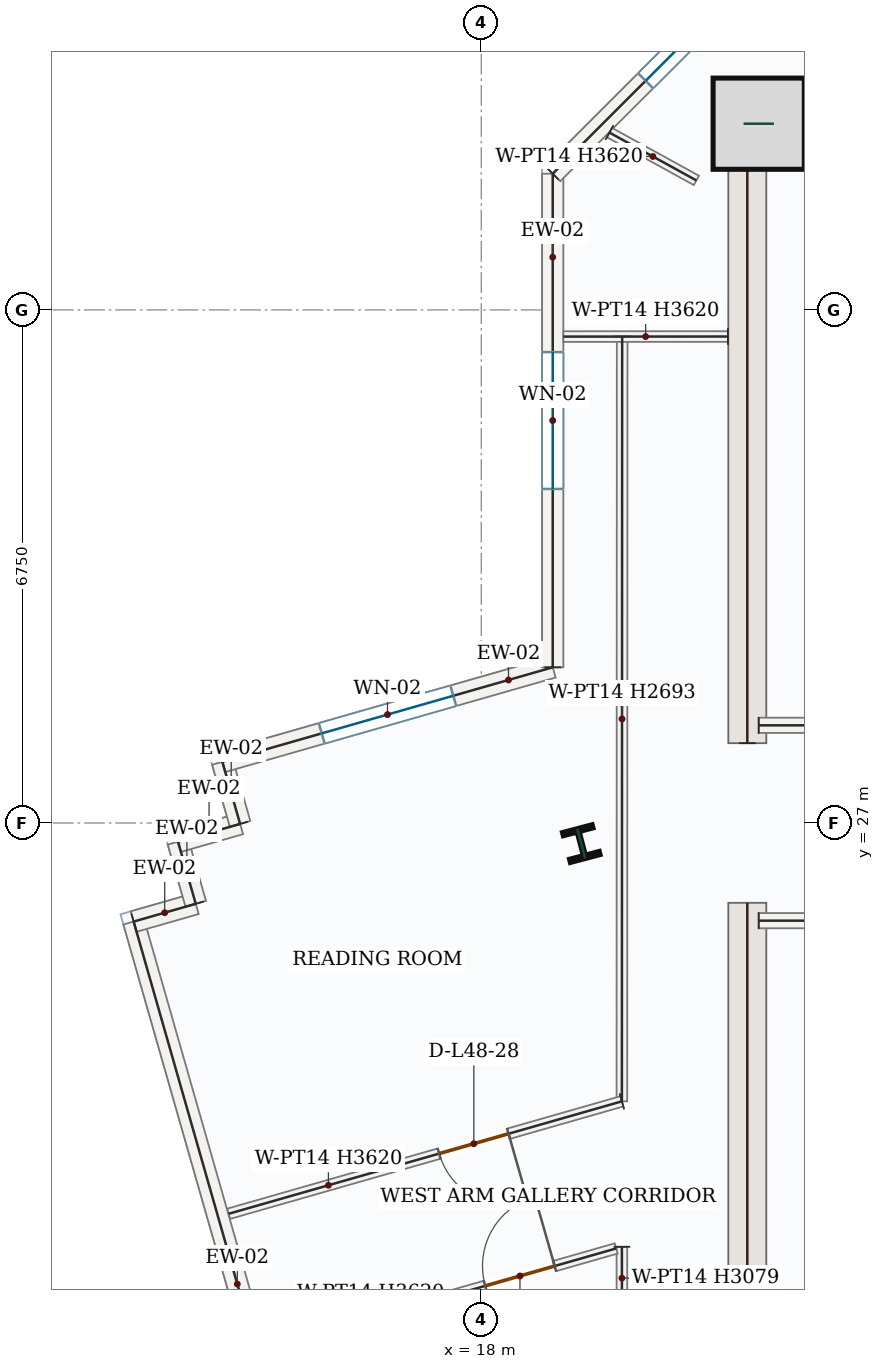
"""IFC4 building model, lengths in metres.
Left out: names, types, materials, properties, quantities, classifications, styles, units other than length and angle.
Written with IfcOpenShell. Run it as: python <this file> out.ifc"""

import sys

from ifc_helpers import new_model, si_unit, direction, frame, frame_2d, origin, origin_2d, place, context, subcontext, project, spatial, rectangle, i_section, extrude, source, transform, mapped, element, fill, save


model = new_model("IFC4")
c1 = context("Model", 3, precision=1e-05, world=origin(), true_north=direction((0.0, 1.0)))
c2 = subcontext(c1, "Body", "Model", "MODEL_VIEW")
j1 = project(units=[si_unit("LENGTHUNIT", "METRE"), si_unit("PLANEANGLEUNIT", "RADIAN")], contexts=[c1])
p1 = place(None, origin())
s1 = spatial("IfcSite", under=j1, at=p1, CompositionType="ELEMENT")
p2 = place(p1, origin())
s2 = spatial("IfcBuilding", under=s1, at=p2, CompositionType="ELEMENT")
p3 = place(p2, frame((0.0, 0.0, 205.8)))
s3 = spatial("IfcBuildingStorey", under=s2, at=p3, CompositionType="ELEMENT", Elevation=205.8)
m1 = source(origin(), c2, "Body", "SweptSolid", [
    extrude(rectangle(XDim=8.55, YDim=0.5, at=frame_2d((4.275, 0.0))), origin(), (0.0, 0.0, 1.0), 3.62),
])
for number, where, z_axis, x_axis in (
    (1, (21.5, 17.4, 0.0), (0.0, 0.0, 1.0), (0.0, 1.0, 0.0)),
    (2, (21.5, 28.05, 0.0), (0.0, 0.0, 1.0), (0.0, 1.0, 0.0)),
):
    element("IfcWall", number, at=place(p3, frame(where, z_axis=z_axis, x_axis=x_axis)), inside=s3, PredefinedType="SHEAR", context=c2, shape_type="MappedRepresentation", body=[
        mapped(m1, transform((0.0, 0.0, 0.0), x_axis=(1.0, 0.0, 0.0), y_axis=(0.0, 1.0, 0.0), z_axis=(0.0, 0.0, 1.0), scale=1.0)),
    ])
m2 = source(origin(), c2, "Body", "SweptSolid", [
    extrude(rectangle(XDim=7.0, YDim=0.5, at=frame_2d((3.5, 0.0))), origin(), (0.0, 0.0, 1.0), 3.62),
])
p4 = place(p3, frame((21.75, 36.35, 0.0), z_axis=(0.0, 0.0, 1.0), x_axis=(1.0, 0.0, 0.0)))
e3 = element("IfcWall", 3, at=p4, inside=s3, PredefinedType="SHEAR", context=c2, shape_type="MappedRepresentation", body=[
    mapped(m2, transform((0.0, 0.0, 0.0), x_axis=(1.0, 0.0, 0.0), y_axis=(0.0, 1.0, 0.0), z_axis=(0.0, 0.0, 1.0), scale=1.0)),
])
m3 = source(origin(), c2, "Body", "SweptSolid", [
    extrude(rectangle(XDim=1.2, YDim=1.2, at=origin_2d()), origin(), (0.0, 0.0, 1.0), 3.9),
])
p5 = place(p3, frame((21.65, 36.2, 0.0), z_axis=(0.0, 0.0, 1.0), x_axis=(1.0, 0.0, 0.0)))
e4 = element("IfcColumn", 4, at=p5, inside=s3, PredefinedType="COLUMN", context=c2, shape_type="MappedRepresentation", body=[
    mapped(m3, transform((0.0, 0.0, 0.0), x_axis=(1.0, 0.0, 0.0), y_axis=(0.0, 1.0, 0.0), z_axis=(0.0, 0.0, 1.0), scale=1.0)),
])
m4 = source(origin(), c2, "Body", "SweptSolid", [
    extrude(i_section(OverallWidth=0.404, OverallDepth=0.407, WebThickness=0.027, FlangeThickness=0.044, FilletRadius=0.018, at=origin_2d()), origin(), (0.0, 0.0, 1.0), 3.9),
])
p6 = place(p3, frame((19.316, 26.729, 0.0), z_axis=(0.0, 0.0, 1.0), x_axis=(0.966823388604, 0.255445757936, 0.0)))
e5 = element("IfcColumn", 5, at=p6, inside=s3, PredefinedType="COLUMN", context=c2, shape_type="MappedRepresentation", body=[
    mapped(m4, transform((0.0, 0.0, 0.0), x_axis=(1.0, 0.0, 0.0), y_axis=(0.0, 1.0, 0.0), z_axis=(0.0, 0.0, 1.0), scale=1.0)),
])
m5 = source(origin(), c2, "Body", "SweptSolid", [
    extrude(rectangle(XDim=9.92, YDim=0.28, at=frame_2d((4.96, 0.0))), origin(), (0.0, 0.0, 1.0), 3.62),
])
p7 = place(p3, frame((16.154, 16.165, 0.0), z_axis=(0.0, 0.0, 1.0), x_axis=(-0.274971401171, 0.961452405758, 0.0)))
e6 = element("IfcWall", 6, at=p7, inside=s3, PredefinedType="SOLIDWALL", context=c2, shape_type="MappedRepresentation", body=[
    mapped(m5, transform((0.0, 0.0, 0.0), x_axis=(1.0, 0.0, 0.0), y_axis=(0.0, 1.0, 0.0), z_axis=(0.0, 0.0, 1.0), scale=1.0)),
])
m6 = source(origin(), c2, "Body", "SweptSolid", [
    extrude(rectangle(XDim=0.85, YDim=0.28, at=frame_2d((0.425, 0.0))), origin(), (0.0, 0.0, 1.0), 3.62),
])
for number, where, z_axis, x_axis in (
    (7, (13.427, 25.703, 0.0), (0.0, 0.0, 1.0), (0.961, 0.275, 0.0)),
    (8, (14.244, 25.937, 0.0), (0.0, 0.0, 1.0), (-0.275, 0.961, 0.0)),
    (9, (14.01, 26.754, 0.0), (0.0, 0.0, 1.0), (0.961, 0.275, 0.0)),
    (10, (14.827, 26.988, 0.0), (0.0, 0.0, 1.0), (-0.275, 0.961, 0.0)),
):
    element("IfcWall", number, at=place(p3, frame(where, z_axis=z_axis, x_axis=x_axis)), inside=s3, PredefinedType="SOLIDWALL", context=c2, shape_type="MappedRepresentation", body=[
        mapped(m6, transform((0.0, 0.0, 0.0), x_axis=(1.0, 0.0, 0.0), y_axis=(0.0, 1.0, 0.0), z_axis=(0.0, 0.0, 1.0), scale=1.0)),
    ])
p8 = place(p3, frame((14.594, 27.805, 0.0), z_axis=(0.0, 0.0, 1.0), x_axis=(0.961446468673, 0.274992159663, 0.0)))
e11 = element("IfcWall", 11, at=p8, inside=s3, PredefinedType="SOLIDWALL", context=c2, shape_type="SweptSolid", body=[
    extrude(rectangle(XDim=4.521, YDim=0.28, at=frame_2d((2.26, 0.0))), origin(), (0.0, 0.0, 1.0), 3.62),
])
p9 = place(p8, frame((1.36, 0.0, 0.85)))
e12 = element("IfcOpeningElement", 12, at=p9, cuts=e11, PredefinedType="OPENING", context=c2, shape_type="SweptSolid", body=[
    extrude(rectangle(XDim=1.8, YDim=1.75, at=frame_2d((0.9, 0.875))), frame((0.0, 0.15, 0.0), z_axis=(0.0, -1.0, 0.0), x_axis=(1.0, 0.0, 0.0)), (0.0, 0.0, 1.0), 0.3),
])
p10 = place(p3, frame((18.94, 29.048, 0.0), z_axis=(0.0, 0.0, 1.0), x_axis=(0.0, 1.0, 0.0)))
e13 = element("IfcWall", 13, at=p10, inside=s3, PredefinedType="SOLIDWALL", context=c2, shape_type="SweptSolid", body=[
    extrude(rectangle(XDim=6.494, YDim=0.28, at=frame_2d((3.247, 0.0))), origin(), (0.0, 0.0, 1.0), 3.62),
])
p11 = place(p10, frame((2.347, 0.0, 0.85)))
e14 = element("IfcOpeningElement", 14, at=p11, cuts=e13, PredefinedType="OPENING", context=c2, shape_type="SweptSolid", body=[
    extrude(rectangle(XDim=1.8, YDim=1.75, at=frame_2d((0.9, 0.875))), frame((0.0, 0.15, 0.0), z_axis=(0.0, -1.0, 0.0), x_axis=(1.0, 0.0, 0.0)), (0.0, 0.0, 1.0), 0.3),
])
p12 = place(p3, frame((18.94, 35.542, 0.0), z_axis=(0.0, 0.0, 1.0), x_axis=(0.707106781187, 0.707106781187, 0.0)))
e15 = element("IfcWall", 15, at=p12, inside=s3, PredefinedType="SOLIDWALL", context=c2, shape_type="SweptSolid", body=[
    extrude(rectangle(XDim=5.258, YDim=0.28, at=frame_2d((2.629, 0.0))), origin(), (0.0, 0.0, 1.0), 3.62),
])
p13 = place(p12, frame((1.729, 0.0, 0.85)))
e16 = element("IfcOpeningElement", 16, at=p13, cuts=e15, PredefinedType="OPENING", context=c2, shape_type="SweptSolid", body=[
    extrude(rectangle(XDim=1.8, YDim=1.75, at=frame_2d((0.9, 0.875))), frame((0.0, 0.15, 0.0), z_axis=(0.0, -1.0, 0.0), x_axis=(1.0, 0.0, 0.0)), (0.0, 0.0, 1.0), 0.3),
])
m7 = source(origin(), c2, "Body", "SweptSolid", [
    extrude(rectangle(XDim=4.25, YDim=0.2, at=frame_2d((2.125, 0.0))), origin(), (0.0, 0.0, 1.0), 3.62),
])
for number, where, z_axis, x_axis in (
    (17, (21.65, 25.715, 0.0), (0.0, 0.0, 1.0), (1.0, 0.0, 0.0)),
    (18, (21.65, 28.285, 0.0), (0.0, 0.0, 1.0), (1.0, 0.0, 0.0)),
):
    element("IfcWall", number, at=place(p3, frame(where, z_axis=z_axis, x_axis=x_axis)), inside=s3, PredefinedType="SOLIDWALL", context=c2, shape_type="MappedRepresentation", body=[
        mapped(m7, transform((0.0, 0.0, 0.0), x_axis=(1.0, 0.0, 0.0), y_axis=(0.0, 1.0, 0.0), z_axis=(0.0, 0.0, 1.0), scale=1.0)),
    ])
m8 = source(origin(), c2, "Body", "SweptSolid", [
    extrude(rectangle(XDim=10.061, YDim=0.14, at=frame_2d((5.031, 0.0))), origin(), (0.0, 0.0, 1.0), 2.693),
])
p14 = place(p3, frame((19.854, 33.399, 0.0), z_axis=(0.0, 0.0, 1.0), x_axis=(-0.000363980467, -0.999999933759, 0.0)))
e19 = element("IfcWall", 19, at=p14, inside=s3, PredefinedType="PARTITIONING", context=c2, shape_type="MappedRepresentation", body=[
    mapped(m8, transform((0.0, 0.0, 0.0), x_axis=(1.0, 0.0, 0.0), y_axis=(0.0, 1.0, 0.0), z_axis=(0.0, 0.0, 1.0), scale=1.0)),
])
p15 = place(p3, frame((19.85, 23.338, 0.0), z_axis=(0.0, 0.0, 1.0), x_axis=(-0.961455430103, -0.274960826164, 0.0)))
e20 = element("IfcWall", 20, at=p15, inside=s3, PredefinedType="PARTITIONING", context=c2, shape_type="SweptSolid", body=[
    extrude(rectangle(XDim=5.381, YDim=0.14, at=frame_2d((2.69, 0.0))), origin(), (0.0, 0.0, 1.0), 3.62),
])
p16 = place(p15, frame((1.551, 0.0, 0.0)))
e21 = element("IfcOpeningElement", 21, at=p16, cuts=e20, PredefinedType="OPENING", context=c2, shape_type="SweptSolid", body=[
    extrude(rectangle(XDim=0.95, YDim=2.15, at=frame_2d((0.475, 1.075))), frame((0.0, 0.08, 0.0), z_axis=(0.0, -1.0, 0.0), x_axis=(1.0, 0.0, 0.0)), (0.0, 0.0, 1.0), 0.16),
])
m9 = source(origin(), c2, "Body", "SweptSolid", [
    extrude(rectangle(XDim=1.305, YDim=0.14, at=frame_2d((0.653, 0.0))), origin(), (0.0, 0.0, 1.0), 3.62),
])
p17 = place(p3, frame((19.686, 36.083, 0.0), z_axis=(0.0, 0.0, 1.0), x_axis=(0.876117183384, -0.48209820678, 0.0)))
e22 = element("IfcWall", 22, at=p17, inside=s3, PredefinedType="PARTITIONING", context=c2, shape_type="MappedRepresentation", body=[
    mapped(m9, transform((0.0, 0.0, 0.0), x_axis=(1.0, 0.0, 0.0), y_axis=(0.0, 1.0, 0.0), z_axis=(0.0, 0.0, 1.0), scale=1.0)),
])
m10 = source(origin(), c2, "Body", "SweptSolid", [
    extrude(rectangle(XDim=2.165, YDim=0.14, at=frame_2d((1.083, 0.0))), origin(), (0.0, 0.0, 1.0), 3.62),
])
p18 = place(p3, frame((21.245, 33.4, 0.0), z_axis=(0.0, 0.0, 1.0), x_axis=(-0.999999942778, -0.000338294974, 0.0)))
e23 = element("IfcWall", 23, at=p18, inside=s3, PredefinedType="PARTITIONING", context=c2, shape_type="MappedRepresentation", body=[
    mapped(m10, transform((0.0, 0.0, 0.0), x_axis=(1.0, 0.0, 0.0), y_axis=(0.0, 1.0, 0.0), z_axis=(0.0, 0.0, 1.0), scale=1.0)),
])
m11 = source(origin(), c2, "Body", "SweptSolid", [
    extrude(rectangle(XDim=0.823, YDim=0.14, at=frame_2d((0.412, 0.0))), origin(), (0.0, 0.0, 1.0), 3.079),
])
p19 = place(p3, frame((19.85, 21.424, 0.0), z_axis=(0.0, 0.0, 1.0), x_axis=(0.001186238786, -0.999999296419, 0.0)))
e24 = element("IfcWall", 24, at=p19, inside=s3, PredefinedType="PARTITIONING", context=c2, shape_type="MappedRepresentation", body=[
    mapped(m11, transform((0.0, 0.0, 0.0), x_axis=(1.0, 0.0, 0.0), y_axis=(0.0, 1.0, 0.0), z_axis=(0.0, 0.0, 1.0), scale=1.0)),
])
p20 = place(p3, frame((15.183, 20.09, 0.0), z_axis=(0.0, 0.0, 1.0), x_axis=(0.961460270043, 0.274943901784, 0.0)))
e25 = element("IfcWall", 25, at=p20, inside=s3, PredefinedType="PARTITIONING", context=c2, shape_type="SweptSolid", body=[
    extrude(rectangle(XDim=4.776, YDim=0.14, at=frame_2d((2.388, 0.0))), origin(), (0.0, 0.0, 1.0), 3.62),
])
p21 = place(p20, frame((2.985, 0.0, 0.0)))
e26 = element("IfcOpeningElement", 26, at=p21, cuts=e25, PredefinedType="OPENING", context=c2, shape_type="SweptSolid", body=[
    extrude(rectangle(XDim=0.95, YDim=2.15, at=frame_2d((0.475, 1.075))), frame((0.0, 0.08, 0.0), z_axis=(0.0, -1.0, 0.0), x_axis=(1.0, 0.0, 0.0)), (0.0, 0.0, 1.0), 0.16),
])
m12 = source(origin(), c2, "Body", "SweptSolid", [
    extrude(rectangle(XDim=1.8, YDim=1.75, at=frame_2d((0.9, 0.875))), frame((0.0, 0.03, 0.0), z_axis=(0.0, -1.0, 0.0), x_axis=(1.0, 0.0, 0.0)), (0.0, 0.0, 1.0), 0.06),
])
p22 = place(p9, origin())
e27 = element("IfcWindow", 27, at=p22, inside=s3, PartitioningType="DOUBLE_PANEL_VERTICAL", PredefinedType="WINDOW", context=c2, shape_type="MappedRepresentation", body=[
    mapped(m12, transform((0.0, 0.0, 0.0), x_axis=(1.0, 0.0, 0.0), y_axis=(0.0, 1.0, 0.0), z_axis=(0.0, 0.0, 1.0), scale=1.0)),
])
fill(e12, e27)
p23 = place(p11, origin())
e28 = element("IfcWindow", 28, at=p23, inside=s3, PartitioningType="DOUBLE_PANEL_VERTICAL", PredefinedType="WINDOW", context=c2, shape_type="MappedRepresentation", body=[
    mapped(m12, transform((0.0, 0.0, 0.0), x_axis=(1.0, 0.0, 0.0), y_axis=(0.0, 1.0, 0.0), z_axis=(0.0, 0.0, 1.0), scale=1.0)),
])
fill(e14, e28)
p24 = place(p13, origin())
e29 = element("IfcWindow", 29, at=p24, inside=s3, PartitioningType="DOUBLE_PANEL_VERTICAL", PredefinedType="WINDOW", context=c2, shape_type="MappedRepresentation", body=[
    mapped(m12, transform((0.0, 0.0, 0.0), x_axis=(1.0, 0.0, 0.0), y_axis=(0.0, 1.0, 0.0), z_axis=(0.0, 0.0, 1.0), scale=1.0)),
])
fill(e16, e29)
m13 = source(origin(), c2, "Body", "SweptSolid", [
    extrude(rectangle(XDim=0.95, YDim=2.15, at=frame_2d((0.475, 1.075))), frame((0.0, 0.025, 0.0), z_axis=(0.0, -1.0, 0.0), x_axis=(1.0, 0.0, 0.0)), (0.0, 0.0, 1.0), 0.05),
])
p25 = place(p16, origin())
e30 = element("IfcDoor", 30, at=p25, inside=s3, OperationType="SINGLE_SWING_LEFT", PredefinedType="DOOR", context=c2, shape_type="MappedRepresentation", body=[
    mapped(m13, transform((0.0, 0.0, 0.0), x_axis=(1.0, 0.0, 0.0), y_axis=(0.0, 1.0, 0.0), z_axis=(0.0, 0.0, 1.0), scale=1.0)),
])
fill(e21, e30)
p26 = place(p21, origin())
e31 = element("IfcDoor", 31, at=p26, inside=s3, OperationType="SINGLE_SWING_RIGHT", PredefinedType="DOOR", context=c2, shape_type="MappedRepresentation", body=[
    mapped(m13, transform((0.0, 0.0, 0.0), x_axis=(1.0, 0.0, 0.0), y_axis=(0.0, 1.0, 0.0), z_axis=(0.0, 0.0, 1.0), scale=1.0)),
])
fill(e26, e31)
save(model, sys.argv[1])
